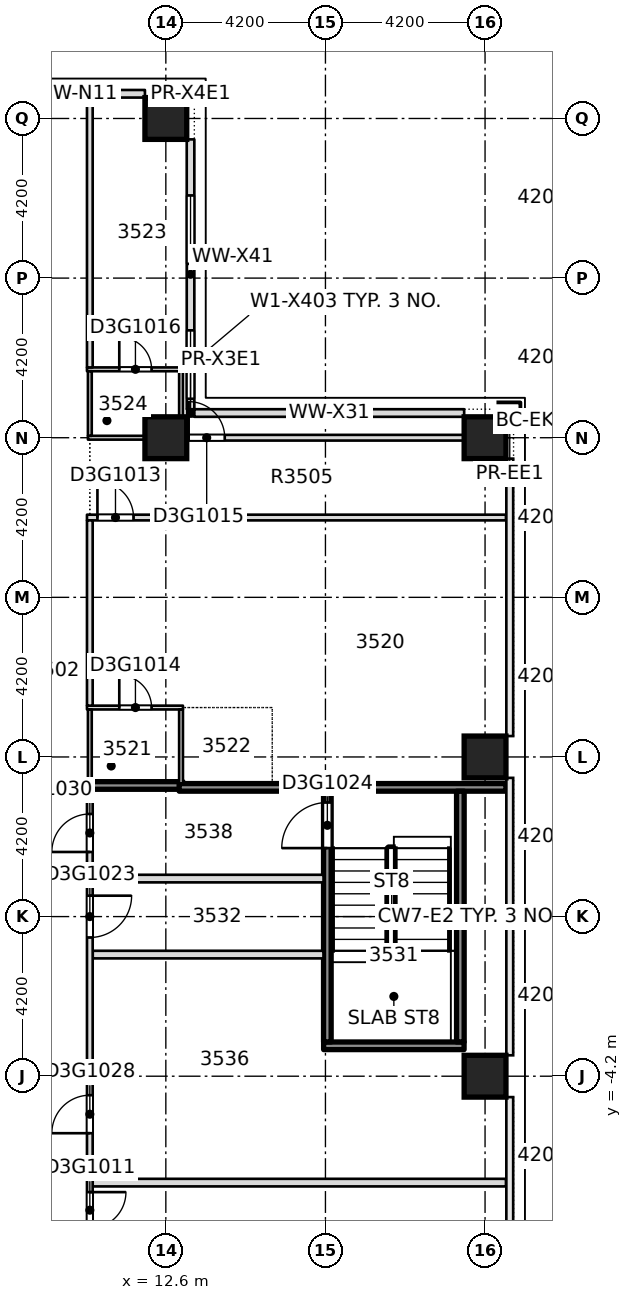
"""IFC4 building model, lengths in metres.
Left out: names, types, materials, properties, quantities, classifications, styles, units other than length and angle.
Written with IfcOpenShell. Run it as: python <this file> out.ifc"""

import sys

from ifc_helpers import new_model, si_unit, direction, frame, frame_2d, origin, origin_2d, place, context, subcontext, project, spatial, rectangle, extrude, element, fill, save


model = new_model("IFC4")
c1 = context("Model", 3, precision=1e-05, world=origin(), true_north=direction((0.0, 1.0)))
c2 = subcontext(c1, "Body", "Model", "MODEL_VIEW")
j1 = project(units=[si_unit("LENGTHUNIT", "METRE"), si_unit("PLANEANGLEUNIT", "RADIAN")], contexts=[c1])
p1 = place(None, origin())
s1 = spatial("IfcSite", under=j1, at=p1, CompositionType="ELEMENT")
p2 = place(p1, origin())
s2 = spatial("IfcBuilding", under=s1, at=p2, CompositionType="ELEMENT")
p3 = place(p2, frame((0.0, 0.0, 140.0)))
s3 = spatial("IfcBuildingStorey", under=s2, at=p3, CompositionType="ELEMENT", Elevation=140.0)
for number, where, z_axis, x_axis in (
    (1, (21.0, -4.2, -0.4), (0.0, 0.0, 1.0), (1.0, 0.0, 0.0)),
    (2, (21.0, 4.2, -0.4), (0.0, 0.0, 1.0), (1.0, 0.0, 0.0)),
    (3, (12.6, 12.6, -0.4), (0.0, 0.0, 1.0), (1.0, 0.0, 0.0)),
    (4, (21.0, 12.6, -0.4), (0.0, 0.0, 1.0), (1.0, 0.0, 0.0)),
    (5, (12.6, 21.0, -0.4), (0.0, 0.0, 1.0), (1.0, 0.0, 0.0)),
):
    element("IfcColumn", number, at=place(p3, frame(where, z_axis=z_axis, x_axis=x_axis)), inside=s3, PredefinedType="COLUMN", context=c2, shape_type="SweptSolid", body=[
        extrude(rectangle(XDim=1.1, YDim=1.1, at=origin_2d()), origin(), (0.0, 0.0, 1.0), 3.45),
    ])
p4 = place(p3, frame((10.675, -7.0, 0.0), z_axis=(0.0, 0.0, 1.0), x_axis=(1.0, 0.0, 0.0)))
e6 = element("IfcWall", 6, at=p4, inside=s3, PredefinedType="PARTITIONING", context=c2, shape_type="SweptSolid", body=[
    extrude(rectangle(XDim=10.875, YDim=0.2, at=frame_2d((5.438, 0.0))), origin(), (0.0, 0.0, 1.0), 3.05),
])
p5 = place(p3, frame((16.752, -3.4, 0.0), z_axis=(0.0, 0.0, 1.0), x_axis=(1.0, 0.0, 0.0)))
e7 = element("IfcWall", 7, at=p5, inside=s3, PredefinedType="SOLIDWALL", context=c2, shape_type="SweptSolid", body=[
    extrude(rectangle(XDim=3.696, YDim=0.2, at=frame_2d((1.848, 0.0))), origin(), (0.0, 0.0, 1.0), 3.05),
])
p6 = place(p3, frame((10.677, -1.0, 0.0), z_axis=(0.0, 0.0, 1.0), x_axis=(1.0, 0.0, 0.0)))
e8 = element("IfcWall", 8, at=p6, inside=s3, PredefinedType="PARTITIONING", context=c2, shape_type="SweptSolid", body=[
    extrude(rectangle(XDim=6.071, YDim=0.2, at=frame_2d((3.036, 0.0))), origin(), (0.0, 0.0, 1.0), 3.05),
])
p7 = place(p3, frame((10.675, 1.0, 0.0), z_axis=(0.0, 0.0, 1.0), x_axis=(1.0, 0.0, 0.0)))
e9 = element("IfcWall", 9, at=p7, inside=s3, PredefinedType="PARTITIONING", context=c2, shape_type="SweptSolid", body=[
    extrude(rectangle(XDim=6.075, YDim=0.2, at=frame_2d((3.038, 0.0))), origin(), (0.0, 0.0, 1.0), 3.05),
])
p8 = place(p3, frame((10.525, 3.45, 0.0), z_axis=(0.0, 0.0, 1.0), x_axis=(1.0, 0.0, 0.0)))
e10 = element("IfcWall", 10, at=p8, inside=s3, PredefinedType="SOLIDWALL", context=c2, shape_type="SweptSolid", body=[
    extrude(rectangle(XDim=2.525, YDim=0.2, at=frame_2d((1.263, 0.0))), origin(), (0.0, 0.0, 1.0), 3.05),
])
p9 = place(p3, frame((12.95, 3.4, 0.0), z_axis=(0.0, 0.0, 1.0), x_axis=(1.0, 0.0, 0.0)))
e11 = element("IfcWall", 11, at=p9, inside=s3, PredefinedType="SOLIDWALL", context=c2, shape_type="SweptSolid", body=[
    extrude(rectangle(XDim=8.6, YDim=0.2, at=frame_2d((4.3, 0.0))), origin(), (0.0, 0.0, 1.0), 3.05),
])
p10 = place(p3, frame((10.525, 5.5, 0.0), z_axis=(0.0, 0.0, 1.0), x_axis=(1.0, 0.0, 0.0)))
e12 = element("IfcWall", 12, at=p10, inside=s3, PredefinedType="PARTITIONING", context=c2, shape_type="SweptSolid", body=[
    extrude(rectangle(XDim=2.525, YDim=0.1, at=frame_2d((1.263, 0.0))), origin(), (0.0, 0.0, 1.0), 3.05),
])
p11 = place(p10, frame((0.85, 0.0, 0.0)))
e13 = element("IfcOpeningElement", 13, at=p11, cuts=e12, PredefinedType="OPENING", context=c2, shape_type="SweptSolid", body=[
    extrude(rectangle(XDim=0.85, YDim=2.1, at=frame_2d((0.425, 1.05))), frame((0.0, 0.06, 0.0), z_axis=(0.0, -1.0, 0.0), x_axis=(1.0, 0.0, 0.0)), (0.0, 0.0, 1.0), 0.12),
])
p12 = place(p3, frame((10.525, 10.5, 0.0), z_axis=(0.0, 0.0, 1.0), x_axis=(1.0, 0.0, 0.0)))
e14 = element("IfcWall", 14, at=p12, inside=s3, PredefinedType="PARTITIONING", context=c2, shape_type="SweptSolid", body=[
    extrude(rectangle(XDim=11.025, YDim=0.15, at=frame_2d((5.513, 0.0))), origin(), (0.0, 0.0, 1.0), 3.05),
])
p13 = place(p12, frame((0.275, 0.0, 0.0)))
e15 = element("IfcOpeningElement", 15, at=p13, cuts=e14, PredefinedType="OPENING", context=c2, shape_type="SweptSolid", body=[
    extrude(rectangle(XDim=0.95, YDim=2.1, at=frame_2d((0.475, 1.05))), frame((0.0, 0.085, 0.0), z_axis=(0.0, -1.0, 0.0), x_axis=(1.0, 0.0, 0.0)), (0.0, 0.0, 1.0), 0.17),
])
p14 = place(p3, frame((10.55, 12.6, 0.0), z_axis=(0.0, 0.0, 1.0), x_axis=(1.0, 0.0, 0.0)))
e16 = element("IfcWall", 16, at=p14, inside=s3, PredefinedType="PARTITIONING", context=c2, shape_type="SweptSolid", body=[
    extrude(rectangle(XDim=2.5, YDim=0.1, at=frame_2d((1.25, 0.0))), origin(), (0.0, 0.0, 1.0), 3.05),
])
p15 = place(p3, frame((12.95, 12.6, 0.0), z_axis=(0.0, 0.0, 1.0), x_axis=(1.0, 0.0, 0.0)))
e17 = element("IfcWall", 17, at=p15, inside=s3, PredefinedType="PARTITIONING", context=c2, shape_type="SweptSolid", body=[
    extrude(rectangle(XDim=0.2, YDim=0.15, at=frame_2d((0.1, 0.0))), origin(), (0.0, 0.0, 1.0), 3.05),
])
p16 = place(p3, frame((10.525, 14.4, 0.0), z_axis=(0.0, 0.0, 1.0), x_axis=(1.0, 0.0, 0.0)))
e18 = element("IfcWall", 18, at=p16, inside=s3, PredefinedType="PARTITIONING", context=c2, shape_type="SweptSolid", body=[
    extrude(rectangle(XDim=2.525, YDim=0.1, at=frame_2d((1.263, 0.0))), origin(), (0.0, 0.0, 1.0), 3.05),
])
p17 = place(p16, frame((0.85, 0.0, 0.0)))
e19 = element("IfcOpeningElement", 19, at=p17, cuts=e18, PredefinedType="OPENING", context=c2, shape_type="SweptSolid", body=[
    extrude(rectangle(XDim=0.85, YDim=2.1, at=frame_2d((0.425, 1.05))), frame((0.0, 0.06, 0.0), z_axis=(0.0, -1.0, 0.0), x_axis=(1.0, 0.0, 0.0)), (0.0, 0.0, 1.0), 0.12),
])
p18 = place(p3, frame((10.6, -10.29, 0.0), z_axis=(0.0, 0.0, 1.0), x_axis=(0.0, 1.0, 0.0)))
e20 = element("IfcWall", 20, at=p18, inside=s3, PredefinedType="PARTITIONING", context=c2, shape_type="SweptSolid", body=[
    extrude(rectangle(XDim=13.64, YDim=0.15, at=frame_2d((6.82, 0.0))), origin(), (0.0, 0.0, 1.0), 3.05),
])
p19 = place(p18, frame((2.09, 0.0, 0.0)))
e21 = element("IfcOpeningElement", 21, at=p19, cuts=e20, PredefinedType="OPENING", context=c2, shape_type="SweptSolid", body=[
    extrude(rectangle(XDim=0.95, YDim=2.1, at=frame_2d((0.475, 1.05))), frame((0.0, 0.085, 0.0), z_axis=(0.0, -1.0, 0.0), x_axis=(1.0, 0.0, 0.0)), (0.0, 0.0, 1.0), 0.17),
])
p20 = place(p18, frame((9.74, 0.0, 0.0)))
e22 = element("IfcOpeningElement", 22, at=p20, cuts=e20, PredefinedType="OPENING", context=c2, shape_type="SweptSolid", body=[
    extrude(rectangle(XDim=1.1, YDim=2.1, at=frame_2d((0.55, 1.05))), frame((0.0, 0.085, 0.0), z_axis=(0.0, -1.0, 0.0), x_axis=(1.0, 0.0, 0.0)), (0.0, 0.0, 1.0), 0.17),
])
p21 = place(p18, frame((4.59, 0.0, 0.0)))
e23 = element("IfcOpeningElement", 23, at=p21, cuts=e20, PredefinedType="OPENING", context=c2, shape_type="SweptSolid", body=[
    extrude(rectangle(XDim=1.0, YDim=2.1, at=frame_2d((0.5, 1.05))), frame((0.0, 0.085, 0.0), z_axis=(0.0, -1.0, 0.0), x_axis=(1.0, 0.0, 0.0)), (0.0, 0.0, 1.0), 0.17),
])
p22 = place(p18, frame((11.99, 0.0, 0.0)))
e24 = element("IfcOpeningElement", 24, at=p22, cuts=e20, PredefinedType="OPENING", context=c2, shape_type="SweptSolid", body=[
    extrude(rectangle(XDim=1.0, YDim=2.1, at=frame_2d((0.5, 1.05))), frame((0.0, 0.085, 0.0), z_axis=(0.0, -1.0, 0.0), x_axis=(1.0, 0.0, 0.0)), (0.0, 0.0, 1.0), 0.17),
])
p23 = place(p3, frame((10.6, 3.45, 0.0), z_axis=(0.0, 0.0, 1.0), x_axis=(0.0, 1.0, 0.0)))
e25 = element("IfcWall", 25, at=p23, inside=s3, PredefinedType="PARTITIONING", context=c2, shape_type="SweptSolid", body=[
    extrude(rectangle(XDim=2.0, YDim=0.1, at=frame_2d((1.0, 0.0))), origin(), (0.0, 0.0, 1.0), 3.05),
])
p24 = place(p3, frame((10.6, 5.55, 0.0), z_axis=(0.0, 0.0, 1.0), x_axis=(0.0, 1.0, 0.0)))
e26 = element("IfcWall", 26, at=p24, inside=s3, PredefinedType="PARTITIONING", context=c2, shape_type="SweptSolid", body=[
    extrude(rectangle(XDim=4.875, YDim=0.15, at=frame_2d((2.438, 0.0))), origin(), (0.0, 0.0, 1.0), 3.05),
])
p25 = place(p3, frame((10.6, 12.65, 0.0), z_axis=(0.0, 0.0, 1.0), x_axis=(0.0, 1.0, 0.0)))
e27 = element("IfcWall", 27, at=p25, inside=s3, PredefinedType="PARTITIONING", context=c2, shape_type="SweptSolid", body=[
    extrude(rectangle(XDim=1.7, YDim=0.1, at=frame_2d((0.85, 0.0))), origin(), (0.0, 0.0, 1.0), 3.05),
])
p26 = place(p3, frame((10.6, 14.45, 0.0), z_axis=(0.0, 0.0, 1.0), x_axis=(0.0, 1.0, 0.0)))
e28 = element("IfcWall", 28, at=p26, inside=s3, PredefinedType="PARTITIONING", context=c2, shape_type="SweptSolid", body=[
    extrude(rectangle(XDim=7.1, YDim=0.15, at=frame_2d((3.55, 0.0))), origin(), (0.0, 0.0, 1.0), 3.05),
])
p27 = place(p3, frame((13.0, 3.5, 0.0), z_axis=(0.0, 0.0, 1.0), x_axis=(0.0, 1.0, 0.0)))
e29 = element("IfcWall", 29, at=p27, inside=s3, PredefinedType="PARTITIONING", context=c2, shape_type="SweptSolid", body=[
    extrude(rectangle(XDim=1.95, YDim=0.1, at=frame_2d((0.975, 0.0))), origin(), (0.0, 0.0, 1.0), 3.05),
])
p28 = place(p3, frame((13.0, 12.675, 0.0), z_axis=(0.0, 0.0, 1.0), x_axis=(0.0, 1.0, 0.0)))
e30 = element("IfcWall", 30, at=p28, inside=s3, PredefinedType="PARTITIONING", context=c2, shape_type="SweptSolid", body=[
    extrude(rectangle(XDim=1.675, YDim=0.1, at=frame_2d((0.837, 0.0))), origin(), (0.0, 0.0, 1.0), 3.05),
])
p29 = place(p3, frame((16.85, -3.298, 0.0), z_axis=(0.0, 0.0, 1.0), x_axis=(0.0, 1.0, 0.0)))
e31 = element("IfcWall", 31, at=p29, inside=s3, PredefinedType="SOLIDWALL", context=c2, shape_type="SweptSolid", body=[
    extrude(rectangle(XDim=6.598, YDim=0.2, at=frame_2d((3.299, 0.0))), origin(), (0.0, 0.0, 1.0), 3.05),
])
p30 = place(p29, frame((5.1, 0.0, 0.0)))
e32 = element("IfcOpeningElement", 32, at=p30, cuts=e31, PredefinedType="OPENING", context=c2, shape_type="SweptSolid", body=[
    extrude(rectangle(XDim=1.2, YDim=2.1, at=frame_2d((0.6, 1.05))), frame((0.0, 0.11, 0.0), z_axis=(0.0, -1.0, 0.0), x_axis=(1.0, 0.0, 0.0)), (0.0, 0.0, 1.0), 0.22),
])
p31 = place(p3, frame((20.35, -3.298, 0.0), z_axis=(0.0, 0.0, 1.0), x_axis=(0.0, 1.0, 0.0)))
e33 = element("IfcWall", 33, at=p31, inside=s3, PredefinedType="SOLIDWALL", context=c2, shape_type="SweptSolid", body=[
    extrude(rectangle(XDim=6.596, YDim=0.2, at=frame_2d((3.298, 0.0))), origin(), (0.0, 0.0, 1.0), 3.05),
])
p32 = place(p3, frame((20.45, 13.25, 0.0), z_axis=(0.0, 0.0, 1.0), x_axis=(-1.0, 0.0, 0.0)))
e34 = element("IfcWall", 34, at=p32, inside=s3, PredefinedType="STANDARD", context=c2, shape_type="SweptSolid", body=[
    extrude(rectangle(XDim=7.1, YDim=0.2, at=frame_2d((3.55, 0.0))), origin(), (0.0, 0.0, 1.0), 3.05),
])
p33 = place(p3, frame((13.25, 13.35, 0.0), z_axis=(0.0, 0.0, 1.0), x_axis=(0.0, 1.0, 0.0)))
e35 = element("IfcWall", 35, at=p33, inside=s3, PredefinedType="STANDARD", context=c2, shape_type="SweptSolid", body=[
    extrude(rectangle(XDim=7.1, YDim=0.2, at=frame_2d((3.55, 0.0))), origin(), (0.0, 0.0, 1.0), 3.05),
])
p34 = place(p33, frame((0.275, 0.0, 0.2)))
e36 = element("IfcOpeningElement", 36, at=p34, cuts=e35, PredefinedType="OPENING", context=c2, shape_type="SweptSolid", body=[
    extrude(rectangle(XDim=1.8, YDim=2.65, at=frame_2d((0.9, 1.325))), frame((0.0, 0.11, 0.0), z_axis=(0.0, -1.0, 0.0), x_axis=(1.0, 0.0, 0.0)), (0.0, 0.0, 1.0), 0.22),
])
p35 = place(p33, frame((3.825, 0.0, 0.2)))
e37 = element("IfcOpeningElement", 37, at=p35, cuts=e35, PredefinedType="OPENING", context=c2, shape_type="SweptSolid", body=[
    extrude(rectangle(XDim=1.8, YDim=2.65, at=frame_2d((0.9, 1.325))), frame((0.0, 0.11, 0.0), z_axis=(0.0, -1.0, 0.0), x_axis=(1.0, 0.0, 0.0)), (0.0, 0.0, 1.0), 0.22),
])
p36 = place(p3, frame((12.05, 21.65, 0.0), z_axis=(0.0, 0.0, 1.0), x_axis=(-1.0, 0.0, 0.0)))
e38 = element("IfcWall", 38, at=p36, inside=s3, PredefinedType="STANDARD", context=c2, shape_type="SweptSolid", body=[
    extrude(rectangle(XDim=3.65, YDim=0.2, at=frame_2d((1.825, 0.0))), origin(), (0.0, 0.0, 1.0), 3.05),
])
p37 = place(p36, frame((1.67, 0.0, 0.2)))
e39 = element("IfcOpeningElement", 39, at=p37, cuts=e38, PredefinedType="OPENING", context=c2, shape_type="SweptSolid", body=[
    extrude(rectangle(XDim=1.8, YDim=2.65, at=frame_2d((0.9, 1.325))), frame((0.0, 0.11, 0.0), z_axis=(0.0, -1.0, 0.0), x_axis=(1.0, 0.0, 0.0)), (0.0, 0.0, 1.0), 0.22),
])
p38 = place(p3, frame((13.15, 12.6, 0.0), z_axis=(0.0, 0.0, 1.0), x_axis=(1.0, 0.0, 0.0)))
e40 = element("IfcWall", 40, at=p38, inside=s3, PredefinedType="PARTITIONING", context=c2, shape_type="SweptSolid", body=[
    extrude(rectangle(XDim=7.3, YDim=0.15, at=frame_2d((3.65, 0.0))), origin(), (0.0, 0.0, 1.0), 2.5),
])
p39 = place(p38, frame((0.05, 0.0, 0.0)))
e41 = element("IfcOpeningElement", 41, at=p39, cuts=e40, PredefinedType="OPENING", context=c2, shape_type="SweptSolid", body=[
    extrude(rectangle(XDim=0.95, YDim=2.1, at=frame_2d((0.475, 1.05))), frame((0.0, 0.085, 0.0), z_axis=(0.0, -1.0, 0.0), x_axis=(1.0, 0.0, 0.0)), (0.0, 0.0, 1.0), 0.17),
])
p40 = place(p3, frame((20.45, 12.6, 0.0), z_axis=(0.0, 0.0, 1.0), x_axis=(1.0, 0.0, 0.0)))
e42 = element("IfcWall", 42, at=p40, inside=s3, PredefinedType="PARTITIONING", context=c2, shape_type="SweptSolid", body=[
    extrude(rectangle(XDim=1.1, YDim=0.15, at=frame_2d((0.55, 0.0))), origin(), (0.0, 0.0, 1.0), 3.05),
])
p41 = place(p19, origin())
e43 = element("IfcDoor", 43, at=p41, inside=s3, OperationType="SINGLE_SWING_LEFT", PredefinedType="DOOR", context=c2, shape_type="SweptSolid", body=[
    extrude(rectangle(XDim=0.95, YDim=2.1, at=frame_2d((0.475, 1.05))), frame((0.0, 0.025, 0.0), z_axis=(0.0, -1.0, 0.0), x_axis=(1.0, 0.0, 0.0)), (0.0, 0.0, 1.0), 0.05),
])
fill(e21, e43)
p42 = place(p13, origin())
e44 = element("IfcDoor", 44, at=p42, inside=s3, OperationType="SINGLE_SWING_RIGHT", PredefinedType="DOOR", context=c2, shape_type="SweptSolid", body=[
    extrude(rectangle(XDim=0.95, YDim=2.1, at=frame_2d((0.475, 1.05))), frame((0.0, 0.025, 0.0), z_axis=(0.0, -1.0, 0.0), x_axis=(1.0, 0.0, 0.0)), (0.0, 0.0, 1.0), 0.05),
])
fill(e15, e44)
p43 = place(p11, origin())
e45 = element("IfcDoor", 45, at=p43, inside=s3, OperationType="SINGLE_SWING_RIGHT", PredefinedType="DOOR", context=c2, shape_type="SweptSolid", body=[
    extrude(rectangle(XDim=0.85, YDim=2.1, at=frame_2d((0.425, 1.05))), frame((0.0, 0.025, 0.0), z_axis=(0.0, -1.0, 0.0), x_axis=(1.0, 0.0, 0.0)), (0.0, 0.0, 1.0), 0.05),
])
fill(e13, e45)
p44 = place(p39, origin())
e46 = element("IfcDoor", 46, at=p44, inside=s3, OperationType="SINGLE_SWING_LEFT", PredefinedType="DOOR", context=c2, shape_type="SweptSolid", body=[
    extrude(rectangle(XDim=0.95, YDim=2.1, at=frame_2d((0.475, 1.05))), frame((0.0, 0.025, 0.0), z_axis=(0.0, -1.0, 0.0), x_axis=(1.0, 0.0, 0.0)), (0.0, 0.0, 1.0), 0.05),
])
fill(e41, e46)
p45 = place(p17, origin())
e47 = element("IfcDoor", 47, at=p45, inside=s3, OperationType="SINGLE_SWING_RIGHT", PredefinedType="DOOR", context=c2, shape_type="SweptSolid", body=[
    extrude(rectangle(XDim=0.85, YDim=2.1, at=frame_2d((0.425, 1.05))), frame((0.0, 0.025, 0.0), z_axis=(0.0, -1.0, 0.0), x_axis=(1.0, 0.0, 0.0)), (0.0, 0.0, 1.0), 0.05),
])
fill(e19, e47)
p46 = place(p20, origin())
e48 = element("IfcDoor", 48, at=p46, inside=s3, OperationType="SINGLE_SWING_LEFT", PredefinedType="DOOR", context=c2, shape_type="SweptSolid", body=[
    extrude(rectangle(XDim=1.1, YDim=2.1, at=frame_2d((0.55, 1.05))), frame((0.0, 0.025, 0.0), z_axis=(0.0, -1.0, 0.0), x_axis=(1.0, 0.0, 0.0)), (0.0, 0.0, 1.0), 0.05),
])
fill(e22, e48)
p47 = place(p30, origin())
e49 = element("IfcDoor", 49, at=p47, inside=s3, OperationType="SINGLE_SWING_LEFT", PredefinedType="DOOR", context=c2, shape_type="SweptSolid", body=[
    extrude(rectangle(XDim=1.2, YDim=2.1, at=frame_2d((0.6, 1.05))), frame((0.0, 0.025, 0.0), z_axis=(0.0, -1.0, 0.0), x_axis=(1.0, 0.0, 0.0)), (0.0, 0.0, 1.0), 0.05),
])
fill(e32, e49)
p48 = place(p21, origin())
e50 = element("IfcDoor", 50, at=p48, inside=s3, OperationType="SINGLE_SWING_RIGHT", PredefinedType="DOOR", context=c2, shape_type="SweptSolid", body=[
    extrude(rectangle(XDim=1.0, YDim=2.1, at=frame_2d((0.5, 1.05))), frame((0.0, 0.025, 0.0), z_axis=(0.0, -1.0, 0.0), x_axis=(1.0, 0.0, 0.0)), (0.0, 0.0, 1.0), 0.05),
])
fill(e23, e50)
p49 = place(p22, origin())
e51 = element("IfcDoor", 51, at=p49, inside=s3, OperationType="SINGLE_SWING_LEFT", PredefinedType="DOOR", context=c2, shape_type="SweptSolid", body=[
    extrude(rectangle(XDim=1.0, YDim=2.1, at=frame_2d((0.5, 1.05))), frame((0.0, 0.025, 0.0), z_axis=(0.0, -1.0, 0.0), x_axis=(1.0, 0.0, 0.0)), (0.0, 0.0, 1.0), 0.05),
])
fill(e24, e51)
p50 = place(p34, origin())
e52 = element("IfcWindow", 52, at=p50, inside=s3, PartitioningType="SINGLE_PANEL", PredefinedType="WINDOW", context=c2, shape_type="SweptSolid", body=[
    extrude(rectangle(XDim=1.8, YDim=2.65, at=frame_2d((0.9, 1.325))), frame((0.0, 0.03, 0.0), z_axis=(0.0, -1.0, 0.0), x_axis=(1.0, 0.0, 0.0)), (0.0, 0.0, 1.0), 0.06),
])
fill(e36, e52)
p51 = place(p35, origin())
e53 = element("IfcWindow", 53, at=p51, inside=s3, PartitioningType="SINGLE_PANEL", PredefinedType="WINDOW", context=c2, shape_type="SweptSolid", body=[
    extrude(rectangle(XDim=1.8, YDim=2.65, at=frame_2d((0.9, 1.325))), frame((0.0, 0.03, 0.0), z_axis=(0.0, -1.0, 0.0), x_axis=(1.0, 0.0, 0.0)), (0.0, 0.0, 1.0), 0.06),
])
fill(e37, e53)
p52 = place(p37, origin())
e54 = element("IfcWindow", 54, at=p52, inside=s3, PartitioningType="SINGLE_PANEL", PredefinedType="WINDOW", context=c2, shape_type="SweptSolid", body=[
    extrude(rectangle(XDim=1.8, YDim=2.65, at=frame_2d((0.9, 1.325))), frame((0.0, 0.03, 0.0), z_axis=(0.0, -1.0, 0.0), x_axis=(1.0, 0.0, 0.0)), (0.0, 0.0, 1.0), 0.06),
])
fill(e39, e54)
save(model, sys.argv[1])
